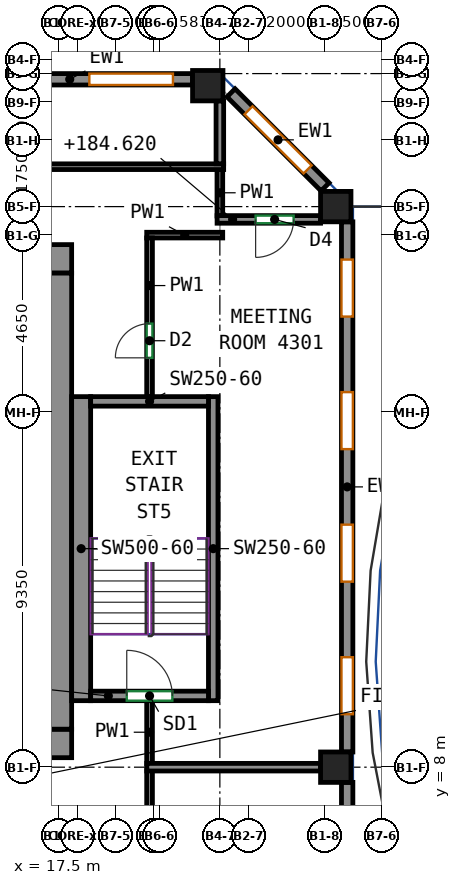
"""IFC4 building model, lengths in metres.
Left out: names, types, materials, properties, quantities, classifications, styles, units other than length and angle.
Written with IfcOpenShell. Run it as: python <this file> out.ifc"""

import sys

from ifc_helpers import new_model, si_unit, direction, frame, frame_2d, origin, origin_2d, place, context, subcontext, project, spatial, rectangle, extrude, source, transform, mapped, element, fill, save


model = new_model("IFC4")
c1 = context("Model", 3, precision=1e-05, world=origin(), true_north=direction((0.0, 1.0)))
c2 = subcontext(c1, "Body", "Model", "MODEL_VIEW")
j1 = project(units=[si_unit("LENGTHUNIT", "METRE"), si_unit("PLANEANGLEUNIT", "RADIAN")], contexts=[c1])
p1 = place(None, origin())
s1 = spatial("IfcSite", under=j1, at=p1, CompositionType="ELEMENT")
p2 = place(p1, origin())
s2 = spatial("IfcBuilding", under=s1, at=p2, CompositionType="ELEMENT")
p3 = place(p2, frame((0.0, 0.0, 182.1)))
s3 = spatial("IfcBuildingStorey", under=s2, at=p3, CompositionType="ELEMENT", Elevation=182.1)
m1 = source(origin(), c2, "Body", "SweptSolid", [
    extrude(rectangle(XDim=0.8, YDim=0.8, at=origin_2d()), origin(), (0.0, 0.0, 1.0), 3.12),
])
for number, where, z_axis, x_axis in (
    (1, (21.432, 25.932, 0.0), (0.0, 0.0, 1.0), (1.0, 0.0, 0.0)),
    (2, (24.8, 8.0, 0.0), (0.0, 0.0, 1.0), (1.0, 0.0, 0.0)),
    (3, (24.8, 22.75, 0.0), (0.0, 0.0, 1.0), (1.0, 0.0, 0.0)),
):
    element("IfcColumn", number, at=place(p3, frame(where, z_axis=z_axis, x_axis=x_axis)), inside=s3, PredefinedType="COLUMN", context=c2, shape_type="MappedRepresentation", body=[
        mapped(m1, transform((0.0, 0.0, 0.0))),
    ])
m2 = source(origin(), c2, "Body", "SweptSolid", [
    extrude(rectangle(XDim=5.38, YDim=0.75, at=frame_2d((2.69, 0.0))), origin(), (0.0, 0.0, 1.0), 3.12),
])
p4 = place(p3, frame((12.47, 8.625, 0.0), z_axis=(0.0, 0.0, 1.0), x_axis=(1.0, 0.0, 0.0)))
e4 = element("IfcWall", 4, at=p4, inside=s3, PredefinedType="SHEAR", context=c2, shape_type="MappedRepresentation", body=[
    mapped(m2, transform((0.0, 0.0, 0.0))),
])
p5 = place(p4, frame((2.18, 0.0, 0.0)))
e5 = element("IfcOpeningElement", 5, at=p5, cuts=e4, PredefinedType="OPENING", context=c2, shape_type="SweptSolid", body=[
    extrude(rectangle(XDim=1.2, YDim=2.1, at=frame_2d((0.6, 1.05))), frame((0.0, 0.385, 0.0), z_axis=(0.0, -1.0, 0.0), x_axis=(1.0, 0.0, 0.0)), (0.0, 0.0, 1.0), 0.77),
])
m3 = source(origin(), c2, "Body", "SweptSolid", [
    extrude(rectangle(XDim=33.6, YDim=0.75, at=frame_2d((16.8, 0.0))), origin(), (0.0, 0.0, 1.0), 3.12),
])
p6 = place(p3, frame((-15.75, 21.375, 0.0), z_axis=(0.0, 0.0, 1.0), x_axis=(1.0, 0.0, 0.0)))
e6 = element("IfcWall", 6, at=p6, inside=s3, PredefinedType="SHEAR", context=c2, shape_type="MappedRepresentation", body=[
    mapped(m3, transform((0.0, 0.0, 0.0))),
])
p7 = place(p6, frame((6.581, 0.0, 0.0)))
e7 = element("IfcOpeningElement", 7, at=p7, cuts=e6, PredefinedType="OPENING", context=c2, shape_type="SweptSolid", body=[
    extrude(rectangle(XDim=0.9, YDim=2.1, at=frame_2d((0.45, 1.05))), frame((0.0, 0.385, 0.0), z_axis=(0.0, -1.0, 0.0), x_axis=(1.0, 0.0, 0.0)), (0.0, 0.0, 1.0), 0.77),
])
p8 = place(p6, frame((11.888, 0.0, 0.0)))
e8 = element("IfcOpeningElement", 8, at=p8, cuts=e6, PredefinedType="OPENING", context=c2, shape_type="SweptSolid", body=[
    extrude(rectangle(XDim=0.9, YDim=2.1, at=frame_2d((0.45, 1.05))), frame((0.0, 0.385, 0.0), z_axis=(0.0, -1.0, 0.0), x_axis=(1.0, 0.0, 0.0)), (0.0, 0.0, 1.0), 0.77),
])
p9 = place(p6, frame((16.296, 0.0, 0.0)))
e9 = element("IfcOpeningElement", 9, at=p9, cuts=e6, PredefinedType="OPENING", context=c2, shape_type="SweptSolid", body=[
    extrude(rectangle(XDim=0.9, YDim=2.1, at=frame_2d((0.45, 1.05))), frame((0.0, 0.385, 0.0), z_axis=(0.0, -1.0, 0.0), x_axis=(1.0, 0.0, 0.0)), (0.0, 0.0, 1.0), 0.77),
])
p10 = place(p6, frame((18.708, 0.0, 0.0)))
e10 = element("IfcOpeningElement", 10, at=p10, cuts=e6, PredefinedType="OPENING", context=c2, shape_type="SweptSolid", body=[
    extrude(rectangle(XDim=0.9, YDim=2.1, at=frame_2d((0.45, 1.05))), frame((0.0, 0.385, 0.0), z_axis=(0.0, -1.0, 0.0), x_axis=(1.0, 0.0, 0.0)), (0.0, 0.0, 1.0), 0.77),
])
p11 = place(p6, frame((21.536, 0.0, 0.0)))
e11 = element("IfcOpeningElement", 11, at=p11, cuts=e6, PredefinedType="OPENING", context=c2, shape_type="SweptSolid", body=[
    extrude(rectangle(XDim=0.9, YDim=2.1, at=frame_2d((0.45, 1.05))), frame((0.0, 0.385, 0.0), z_axis=(0.0, -1.0, 0.0), x_axis=(1.0, 0.0, 0.0)), (0.0, 0.0, 1.0), 0.77),
])
p12 = place(p6, frame((25.877, 0.0, 0.0)))
e12 = element("IfcOpeningElement", 12, at=p12, cuts=e6, PredefinedType="OPENING", context=c2, shape_type="SweptSolid", body=[
    extrude(rectangle(XDim=0.9, YDim=2.1, at=frame_2d((0.45, 1.05))), frame((0.0, 0.385, 0.0), z_axis=(0.0, -1.0, 0.0), x_axis=(1.0, 0.0, 0.0)), (0.0, 0.0, 1.0), 0.77),
])
p13 = place(p6, frame((2.275, 0.0, 0.0)))
e13 = element("IfcOpeningElement", 13, at=p13, cuts=e6, PredefinedType="OPENING", context=c2, shape_type="SweptSolid", body=[
    extrude(rectangle(XDim=0.9, YDim=2.1, at=frame_2d((0.45, 1.05))), frame((0.0, 0.385, 0.0), z_axis=(0.0, -1.0, 0.0), x_axis=(1.0, 0.0, 0.0)), (0.0, 0.0, 1.0), 0.77),
])
p14 = place(p6, frame((30.425, 0.0, 0.0)))
e14 = element("IfcOpeningElement", 14, at=p14, cuts=e6, PredefinedType="OPENING", context=c2, shape_type="SweptSolid", body=[
    extrude(rectangle(XDim=0.9, YDim=2.1, at=frame_2d((0.45, 1.05))), frame((0.0, 0.385, 0.0), z_axis=(0.0, -1.0, 0.0), x_axis=(1.0, 0.0, 0.0)), (0.0, 0.0, 1.0), 0.77),
])
m4 = source(origin(), c2, "Body", "SweptSolid", [
    extrude(rectangle(XDim=12.0, YDim=0.75, at=frame_2d((6.0, 0.0))), origin(), (0.0, 0.0, 1.0), 3.12),
])
p15 = place(p3, frame((17.475, 9.0, 0.0), z_axis=(0.0, 0.0, 1.0), x_axis=(0.0, 1.0, 0.0)))
e15 = element("IfcWall", 15, at=p15, inside=s3, PredefinedType="SHEAR", context=c2, shape_type="MappedRepresentation", body=[
    mapped(m4, transform((0.0, 0.0, 0.0))),
])
m5 = source(origin(), c2, "Body", "SweptSolid", [
    extrude(rectangle(XDim=8.0, YDim=0.5, at=frame_2d((4.0, 0.0))), origin(), (0.0, 0.0, 1.0), 3.12),
])
p16 = place(p3, frame((18.1, 9.75, 0.0), z_axis=(0.0, 0.0, 1.0), x_axis=(0.0, 1.0, 0.0)))
e16 = element("IfcWall", 16, at=p16, inside=s3, PredefinedType="SHEAR", context=c2, shape_type="MappedRepresentation", body=[
    mapped(m5, transform((0.0, 0.0, 0.0))),
])
m6 = source(origin(), c2, "Body", "SweptSolid", [
    extrude(rectangle(XDim=8.0, YDim=0.25, at=frame_2d((4.0, 0.0))), origin(), (0.0, 0.0, 1.0), 3.12),
])
p17 = place(p3, frame((21.575, 9.75, 0.0), z_axis=(0.0, 0.0, 1.0), x_axis=(0.0, 1.0, 0.0)))
e17 = element("IfcWall", 17, at=p17, inside=s3, PredefinedType="SHEAR", context=c2, shape_type="MappedRepresentation", body=[
    mapped(m6, transform((0.0, 0.0, 0.0))),
])
m7 = source(origin(), c2, "Body", "SweptSolid", [
    extrude(rectangle(XDim=3.1, YDim=0.25, at=frame_2d((1.55, 0.0))), origin(), (0.0, 0.0, 1.0), 3.12),
])
p18 = place(p3, frame((18.35, 9.875, 0.0), z_axis=(0.0, 0.0, 1.0), x_axis=(1.0, 0.0, 0.0)))
e18 = element("IfcWall", 18, at=p18, inside=s3, PredefinedType="SHEAR", context=c2, shape_type="MappedRepresentation", body=[
    mapped(m7, transform((0.0, 0.0, 0.0))),
])
p19 = place(p18, frame((0.95, 0.0, 0.0)))
e19 = element("IfcOpeningElement", 19, at=p19, cuts=e18, PredefinedType="OPENING", context=c2, shape_type="SweptSolid", body=[
    extrude(rectangle(XDim=1.2, YDim=2.1, at=frame_2d((0.6, 1.05))), frame((0.0, 0.135, 0.0), z_axis=(0.0, -1.0, 0.0), x_axis=(1.0, 0.0, 0.0)), (0.0, 0.0, 1.0), 0.27),
])
p20 = place(p3, frame((18.35, 17.625, 0.0), z_axis=(0.0, 0.0, 1.0), x_axis=(1.0, 0.0, 0.0)))
e20 = element("IfcWall", 20, at=p20, inside=s3, PredefinedType="SHEAR", context=c2, shape_type="MappedRepresentation", body=[
    mapped(m7, transform((0.0, 0.0, 0.0))),
])
m8 = source(origin(), c2, "Body", "SweptSolid", [
    extrude(rectangle(XDim=7.763, YDim=0.3, at=frame_2d((3.881, 0.0))), origin(), (0.0, 0.0, 1.0), 3.12),
])
p21 = place(p3, frame((25.1, -0.163, 0.0), z_axis=(0.0, 0.0, 1.0), x_axis=(0.0, 1.0, 0.0)))
e21 = element("IfcWall", 21, at=p21, inside=s3, PredefinedType="SOLIDWALL", context=c2, shape_type="MappedRepresentation", body=[
    mapped(m8, transform((0.0, 0.0, 0.0))),
])
p22 = place(p21, frame((1.75, 0.0, 0.85)))
e22 = element("IfcOpeningElement", 22, at=p22, cuts=e21, PredefinedType="OPENING", context=c2, shape_type="SweptSolid", body=[
    extrude(rectangle(XDim=1.5, YDim=1.95, at=frame_2d((0.75, 0.975))), frame((0.0, 0.16, 0.0), z_axis=(0.0, -1.0, 0.0), x_axis=(1.0, 0.0, 0.0)), (0.0, 0.0, 1.0), 0.32),
])
p23 = place(p21, frame((0.45, 0.0, 0.0)))
e23 = element("IfcOpeningElement", 23, at=p23, cuts=e21, PredefinedType="OPENING", context=c2, shape_type="SweptSolid", body=[
    extrude(rectangle(XDim=1.0, YDim=2.1, at=frame_2d((0.5, 1.05))), frame((0.0, 0.16, 0.0), z_axis=(0.0, -1.0, 0.0), x_axis=(1.0, 0.0, 0.0)), (0.0, 0.0, 1.0), 0.32),
])
p24 = place(p21, frame((5.631, 0.0, 0.85)))
e24 = element("IfcOpeningElement", 24, at=p24, cuts=e21, PredefinedType="OPENING", context=c2, shape_type="SweptSolid", body=[
    extrude(rectangle(XDim=1.5, YDim=1.95, at=frame_2d((0.75, 0.975))), frame((0.0, 0.16, 0.0), z_axis=(0.0, -1.0, 0.0), x_axis=(1.0, 0.0, 0.0)), (0.0, 0.0, 1.0), 0.32),
])
p25 = place(p21, frame((4.331, 0.0, 0.0)))
e25 = element("IfcOpeningElement", 25, at=p25, cuts=e21, PredefinedType="OPENING", context=c2, shape_type="SweptSolid", body=[
    extrude(rectangle(XDim=1.0, YDim=2.1, at=frame_2d((0.5, 1.05))), frame((0.0, 0.16, 0.0), z_axis=(0.0, -1.0, 0.0), x_axis=(1.0, 0.0, 0.0)), (0.0, 0.0, 1.0), 0.32),
])
m9 = source(origin(), c2, "Body", "SweptSolid", [
    extrude(rectangle(XDim=13.95, YDim=0.3, at=frame_2d((6.975, 0.0))), origin(), (0.0, 0.0, 1.0), 3.12),
])
p26 = place(p3, frame((25.1, 8.4, 0.0), z_axis=(0.0, 0.0, 1.0), x_axis=(0.0, 1.0, 0.0)))
e26 = element("IfcWall", 26, at=p26, inside=s3, PredefinedType="SOLIDWALL", context=c2, shape_type="MappedRepresentation", body=[
    mapped(m9, transform((0.0, 0.0, 0.0))),
])
p27 = place(p26, frame((0.994, 0.0, 0.85)))
e27 = element("IfcOpeningElement", 27, at=p27, cuts=e26, PredefinedType="OPENING", context=c2, shape_type="SweptSolid", body=[
    extrude(rectangle(XDim=1.5, YDim=1.95, at=frame_2d((0.75, 0.975))), frame((0.0, 0.16, 0.0), z_axis=(0.0, -1.0, 0.0), x_axis=(1.0, 0.0, 0.0)), (0.0, 0.0, 1.0), 0.32),
])
p28 = place(p26, frame((4.481, 0.0, 0.85)))
e28 = element("IfcOpeningElement", 28, at=p28, cuts=e26, PredefinedType="OPENING", context=c2, shape_type="SweptSolid", body=[
    extrude(rectangle(XDim=1.5, YDim=1.95, at=frame_2d((0.75, 0.975))), frame((0.0, 0.16, 0.0), z_axis=(0.0, -1.0, 0.0), x_axis=(1.0, 0.0, 0.0)), (0.0, 0.0, 1.0), 0.32),
])
p29 = place(p26, frame((7.969, 0.0, 0.85)))
e29 = element("IfcOpeningElement", 29, at=p29, cuts=e26, PredefinedType="OPENING", context=c2, shape_type="SweptSolid", body=[
    extrude(rectangle(XDim=1.5, YDim=1.95, at=frame_2d((0.75, 0.975))), frame((0.0, 0.16, 0.0), z_axis=(0.0, -1.0, 0.0), x_axis=(1.0, 0.0, 0.0)), (0.0, 0.0, 1.0), 0.32),
])
p30 = place(p26, frame((11.456, 0.0, 0.85)))
e30 = element("IfcOpeningElement", 30, at=p30, cuts=e26, PredefinedType="OPENING", context=c2, shape_type="SweptSolid", body=[
    extrude(rectangle(XDim=1.5, YDim=1.95, at=frame_2d((0.75, 0.975))), frame((0.0, 0.16, 0.0), z_axis=(0.0, -1.0, 0.0), x_axis=(1.0, 0.0, 0.0)), (0.0, 0.0, 1.0), 0.32),
])
m10 = source(origin(), c2, "Body", "SweptSolid", [
    extrude(rectangle(XDim=3.5, YDim=0.3, at=frame_2d((1.75, 0.0))), origin(), (0.0, 0.0, 1.0), 3.12),
])
p31 = place(p3, frame((24.519, 23.269, 0.0), z_axis=(0.0, 0.0, 1.0), x_axis=(-0.70707190453, 0.707141656123, 0.0)))
e31 = element("IfcWall", 31, at=p31, inside=s3, PredefinedType="SOLIDWALL", context=c2, shape_type="MappedRepresentation", body=[
    mapped(m10, transform((0.0, 0.0, 0.0))),
])
p32 = place(p31, frame((0.65, 0.0, 0.85)))
e32 = element("IfcOpeningElement", 32, at=p32, cuts=e31, PredefinedType="OPENING", context=c2, shape_type="SweptSolid", body=[
    extrude(rectangle(XDim=2.2, YDim=1.95, at=frame_2d((1.1, 0.975))), frame((0.0, 0.16, 0.0), z_axis=(0.0, -1.0, 0.0), x_axis=(1.0, 0.0, 0.0)), (0.0, 0.0, 1.0), 0.32),
])
m11 = source(origin(), c2, "Body", "SweptSolid", [
    extrude(rectangle(XDim=6.465, YDim=0.3, at=frame_2d((3.232, 0.0))), origin(), (0.0, 0.0, 1.0), 3.12),
])
p33 = place(p3, frame((21.032, 26.1, 0.0), z_axis=(0.0, 0.0, 1.0), x_axis=(-1.0, 0.0, 0.0)))
e33 = element("IfcWall", 33, at=p33, inside=s3, PredefinedType="SOLIDWALL", context=c2, shape_type="MappedRepresentation", body=[
    mapped(m11, transform((0.0, 0.0, 0.0))),
])
p34 = place(p33, frame((0.516, 0.0, 0.85)))
e34 = element("IfcOpeningElement", 34, at=p34, cuts=e33, PredefinedType="OPENING", context=c2, shape_type="SweptSolid", body=[
    extrude(rectangle(XDim=2.2, YDim=1.95, at=frame_2d((1.1, 0.975))), frame((0.0, 0.16, 0.0), z_axis=(0.0, -1.0, 0.0), x_axis=(1.0, 0.0, 0.0)), (0.0, 0.0, 1.0), 0.32),
])
p35 = place(p33, frame((3.749, 0.0, 0.85)))
e35 = element("IfcOpeningElement", 35, at=p35, cuts=e33, PredefinedType="OPENING", context=c2, shape_type="SweptSolid", body=[
    extrude(rectangle(XDim=2.2, YDim=1.95, at=frame_2d((1.1, 0.975))), frame((0.0, 0.16, 0.0), z_axis=(0.0, -1.0, 0.0), x_axis=(1.0, 0.0, 0.0)), (0.0, 0.0, 1.0), 0.32),
])
p36 = place(p3, frame((19.9, 3.809, 0.0), z_axis=(0.0, 0.0, 1.0), x_axis=(0.0, 1.0, 0.0)))
e36 = element("IfcWall", 36, at=p36, inside=s3, PredefinedType="PARTITIONING", context=c2, shape_type="SweptSolid", body=[
    extrude(rectangle(XDim=4.101, YDim=0.15, at=frame_2d((2.05, 0.0))), origin(), (0.0, 0.0, 1.0), 3.12),
])
p37 = place(p36, frame((1.4, 0.0, 0.0)))
e37 = element("IfcOpeningElement", 37, at=p37, cuts=e36, PredefinedType="OPENING", context=c2, shape_type="SweptSolid", body=[
    extrude(rectangle(XDim=0.9, YDim=2.1, at=frame_2d((0.45, 1.05))), frame((0.0, 0.085, 0.0), z_axis=(0.0, -1.0, 0.0), x_axis=(1.0, 0.0, 0.0)), (0.0, 0.0, 1.0), 0.17),
])
p38 = place(p3, frame((19.825, 22.0, 0.0), z_axis=(0.0, 0.0, 1.0), x_axis=(1.0, 0.0, 0.0)))
e38 = element("IfcWall", 38, at=p38, inside=s3, PredefinedType="PARTITIONING", context=c2, shape_type="SweptSolid", body=[
    extrude(rectangle(XDim=2.0, YDim=0.15, at=frame_2d((1.0, 0.0))), origin(), (0.0, 0.0, 1.0), 3.12),
])
p39 = place(p3, frame((19.9, 17.75, 0.0), z_axis=(0.0, 0.0, 1.0), x_axis=(0.0, 1.0, 0.0)))
e39 = element("IfcWall", 39, at=p39, inside=s3, PredefinedType="PARTITIONING", context=c2, shape_type="SweptSolid", body=[
    extrude(rectangle(XDim=4.175, YDim=0.15, at=frame_2d((2.087, 0.0))), origin(), (0.0, 0.0, 1.0), 3.12),
])
p40 = place(p39, frame((1.021, 0.0, 0.0)))
e40 = element("IfcOpeningElement", 40, at=p40, cuts=e39, PredefinedType="OPENING", context=c2, shape_type="SweptSolid", body=[
    extrude(rectangle(XDim=0.9, YDim=2.1, at=frame_2d((0.45, 1.05))), frame((0.0, 0.085, 0.0), z_axis=(0.0, -1.0, 0.0), x_axis=(1.0, 0.0, 0.0)), (0.0, 0.0, 1.0), 0.17),
])
p41 = place(p3, frame((19.9, 8.09, 0.0), z_axis=(0.0, 0.0, 1.0), x_axis=(0.0, 1.0, 0.0)))
e41 = element("IfcWall", 41, at=p41, inside=s3, PredefinedType="PARTITIONING", context=c2, shape_type="SweptSolid", body=[
    extrude(rectangle(XDim=1.66, YDim=0.15, at=frame_2d((0.83, 0.0))), origin(), (0.0, 0.0, 1.0), 3.12),
])
p42 = place(p3, frame((21.75, 22.503, 0.0), z_axis=(0.0, 0.0, 1.0), x_axis=(0.0, 1.0, 0.0)))
e42 = element("IfcWall", 42, at=p42, inside=s3, PredefinedType="PARTITIONING", context=c2, shape_type="SweptSolid", body=[
    extrude(rectangle(XDim=1.222, YDim=0.15, at=frame_2d((0.611, 0.0))), origin(), (0.0, 0.0, 1.0), 3.12),
])
p43 = place(p3, frame((21.85, 23.8, 0.0), z_axis=(0.0, 0.0, 1.0), x_axis=(-1.0, 0.0, 0.0)))
e43 = element("IfcWall", 43, at=p43, inside=s3, PredefinedType="PARTITIONING", context=c2, shape_type="SweptSolid", body=[
    extrude(rectangle(XDim=41.909, YDim=0.15, at=frame_2d((20.955, 0.0))), origin(), (0.0, 0.0, 1.0), 3.12),
])
p44 = place(p43, frame((29.607, 0.0, 0.0)))
e44 = element("IfcOpeningElement", 44, at=p44, cuts=e43, PredefinedType="OPENING", context=c2, shape_type="SweptSolid", body=[
    extrude(rectangle(XDim=1.0, YDim=2.1, at=frame_2d((0.5, 1.05))), frame((0.0, 0.085, 0.0), z_axis=(0.0, -1.0, 0.0), x_axis=(1.0, 0.0, 0.0)), (0.0, 0.0, 1.0), 0.17),
])
p45 = place(p3, frame((19.827, 8.0, 0.0), z_axis=(0.0, 0.0, 1.0), x_axis=(1.0, 0.0, 0.0)))
e45 = element("IfcWall", 45, at=p45, inside=s3, PredefinedType="PARTITIONING", context=c2, shape_type="SweptSolid", body=[
    extrude(rectangle(XDim=4.573, YDim=0.2, at=frame_2d((2.287, 0.0))), origin(), (0.0, 0.0, 1.0), 3.12),
])
p46 = place(p3, frame((24.4, 22.413, 0.0), z_axis=(0.0, 0.0, 1.0), x_axis=(-1.0, 0.0, 0.0)))
e46 = element("IfcWall", 46, at=p46, inside=s3, PredefinedType="PARTITIONING", context=c2, shape_type="SweptSolid", body=[
    extrude(rectangle(XDim=2.723, YDim=0.2, at=frame_2d((1.361, 0.0))), origin(), (0.0, 0.0, 1.0), 2.52),
])
p47 = place(p46, frame((0.709, 0.0, 0.0)))
e47 = element("IfcOpeningElement", 47, at=p47, cuts=e46, PredefinedType="OPENING", context=c2, shape_type="SweptSolid", body=[
    extrude(rectangle(XDim=1.0, YDim=2.1, at=frame_2d((0.5, 1.05))), frame((0.0, 0.11, 0.0), z_axis=(0.0, -1.0, 0.0), x_axis=(1.0, 0.0, 0.0)), (0.0, 0.0, 1.0), 0.22),
])
p48 = place(p3, frame((21.75, 25.532, 0.0), z_axis=(0.0, 0.0, 1.0), x_axis=(0.0, -1.0, 0.0)))
e48 = element("IfcWall", 48, at=p48, inside=s3, PredefinedType="PARTITIONING", context=c2, shape_type="SweptSolid", body=[
    extrude(rectangle(XDim=1.655, YDim=0.2, at=frame_2d((0.828, 0.0))), origin(), (0.0, 0.0, 1.0), 3.12),
])
p49 = place(p27, origin())
e49 = element("IfcWindow", 49, at=p49, inside=s3, PartitioningType="SINGLE_PANEL", PredefinedType="WINDOW", context=c2, shape_type="SweptSolid", body=[
    extrude(rectangle(XDim=1.5, YDim=1.95, at=frame_2d((0.75, 0.975))), frame((0.0, 0.03, 0.0), z_axis=(0.0, -1.0, 0.0), x_axis=(1.0, 0.0, 0.0)), (0.0, 0.0, 1.0), 0.06),
])
fill(e27, e49)
p50 = place(p28, origin())
e50 = element("IfcWindow", 50, at=p50, inside=s3, PartitioningType="SINGLE_PANEL", PredefinedType="WINDOW", context=c2, shape_type="SweptSolid", body=[
    extrude(rectangle(XDim=1.5, YDim=1.95, at=frame_2d((0.75, 0.975))), frame((0.0, 0.03, 0.0), z_axis=(0.0, -1.0, 0.0), x_axis=(1.0, 0.0, 0.0)), (0.0, 0.0, 1.0), 0.06),
])
fill(e28, e50)
p51 = place(p29, origin())
e51 = element("IfcWindow", 51, at=p51, inside=s3, PartitioningType="SINGLE_PANEL", PredefinedType="WINDOW", context=c2, shape_type="SweptSolid", body=[
    extrude(rectangle(XDim=1.5, YDim=1.95, at=frame_2d((0.75, 0.975))), frame((0.0, 0.03, 0.0), z_axis=(0.0, -1.0, 0.0), x_axis=(1.0, 0.0, 0.0)), (0.0, 0.0, 1.0), 0.06),
])
fill(e29, e51)
p52 = place(p30, origin())
e52 = element("IfcWindow", 52, at=p52, inside=s3, PartitioningType="SINGLE_PANEL", PredefinedType="WINDOW", context=c2, shape_type="SweptSolid", body=[
    extrude(rectangle(XDim=1.5, YDim=1.95, at=frame_2d((0.75, 0.975))), frame((0.0, 0.03, 0.0), z_axis=(0.0, -1.0, 0.0), x_axis=(1.0, 0.0, 0.0)), (0.0, 0.0, 1.0), 0.06),
])
fill(e30, e52)
p53 = place(p32, origin())
e53 = element("IfcWindow", 53, at=p53, inside=s3, PartitioningType="SINGLE_PANEL", PredefinedType="WINDOW", context=c2, shape_type="SweptSolid", body=[
    extrude(rectangle(XDim=2.2, YDim=1.95, at=frame_2d((1.1, 0.975))), frame((0.0, 0.03, 0.0), z_axis=(0.0, -1.0, 0.0), x_axis=(1.0, 0.0, 0.0)), (0.0, 0.0, 1.0), 0.06),
])
fill(e32, e53)
p54 = place(p34, origin())
e54 = element("IfcWindow", 54, at=p54, inside=s3, PartitioningType="SINGLE_PANEL", PredefinedType="WINDOW", context=c2, shape_type="SweptSolid", body=[
    extrude(rectangle(XDim=2.2, YDim=1.95, at=frame_2d((1.1, 0.975))), frame((0.0, 0.03, 0.0), z_axis=(0.0, -1.0, 0.0), x_axis=(1.0, 0.0, 0.0)), (0.0, 0.0, 1.0), 0.06),
])
fill(e34, e54)
p55 = place(p19, origin())
e55 = element("IfcDoor", 55, at=p55, inside=s3, OperationType="DOUBLE_DOOR_SINGLE_SWING", PredefinedType="DOOR", context=c2, shape_type="SweptSolid", body=[
    extrude(rectangle(XDim=1.2, YDim=2.1, at=frame_2d((0.6, 1.05))), frame((0.0, 0.025, 0.0), z_axis=(0.0, -1.0, 0.0), x_axis=(1.0, 0.0, 0.0)), (0.0, 0.0, 1.0), 0.05),
])
fill(e19, e55)
p56 = place(p40, origin())
e56 = element("IfcDoor", 56, at=p56, inside=s3, OperationType="SINGLE_SWING_LEFT", PredefinedType="DOOR", context=c2, shape_type="SweptSolid", body=[
    extrude(rectangle(XDim=0.9, YDim=2.1, at=frame_2d((0.45, 1.05))), frame((0.0, 0.025, 0.0), z_axis=(0.0, -1.0, 0.0), x_axis=(1.0, 0.0, 0.0)), (0.0, 0.0, 1.0), 0.05),
])
fill(e40, e56)
p57 = place(p47, origin())
e57 = element("IfcDoor", 57, at=p57, inside=s3, OperationType="SINGLE_SWING_RIGHT", PredefinedType="DOOR", context=c2, shape_type="SweptSolid", body=[
    extrude(rectangle(XDim=1.0, YDim=2.1, at=frame_2d((0.5, 1.05))), frame((0.0, 0.025, 0.0), z_axis=(0.0, -1.0, 0.0), x_axis=(1.0, 0.0, 0.0)), (0.0, 0.0, 1.0), 0.05),
])
fill(e47, e57)
save(model, sys.argv[1])
